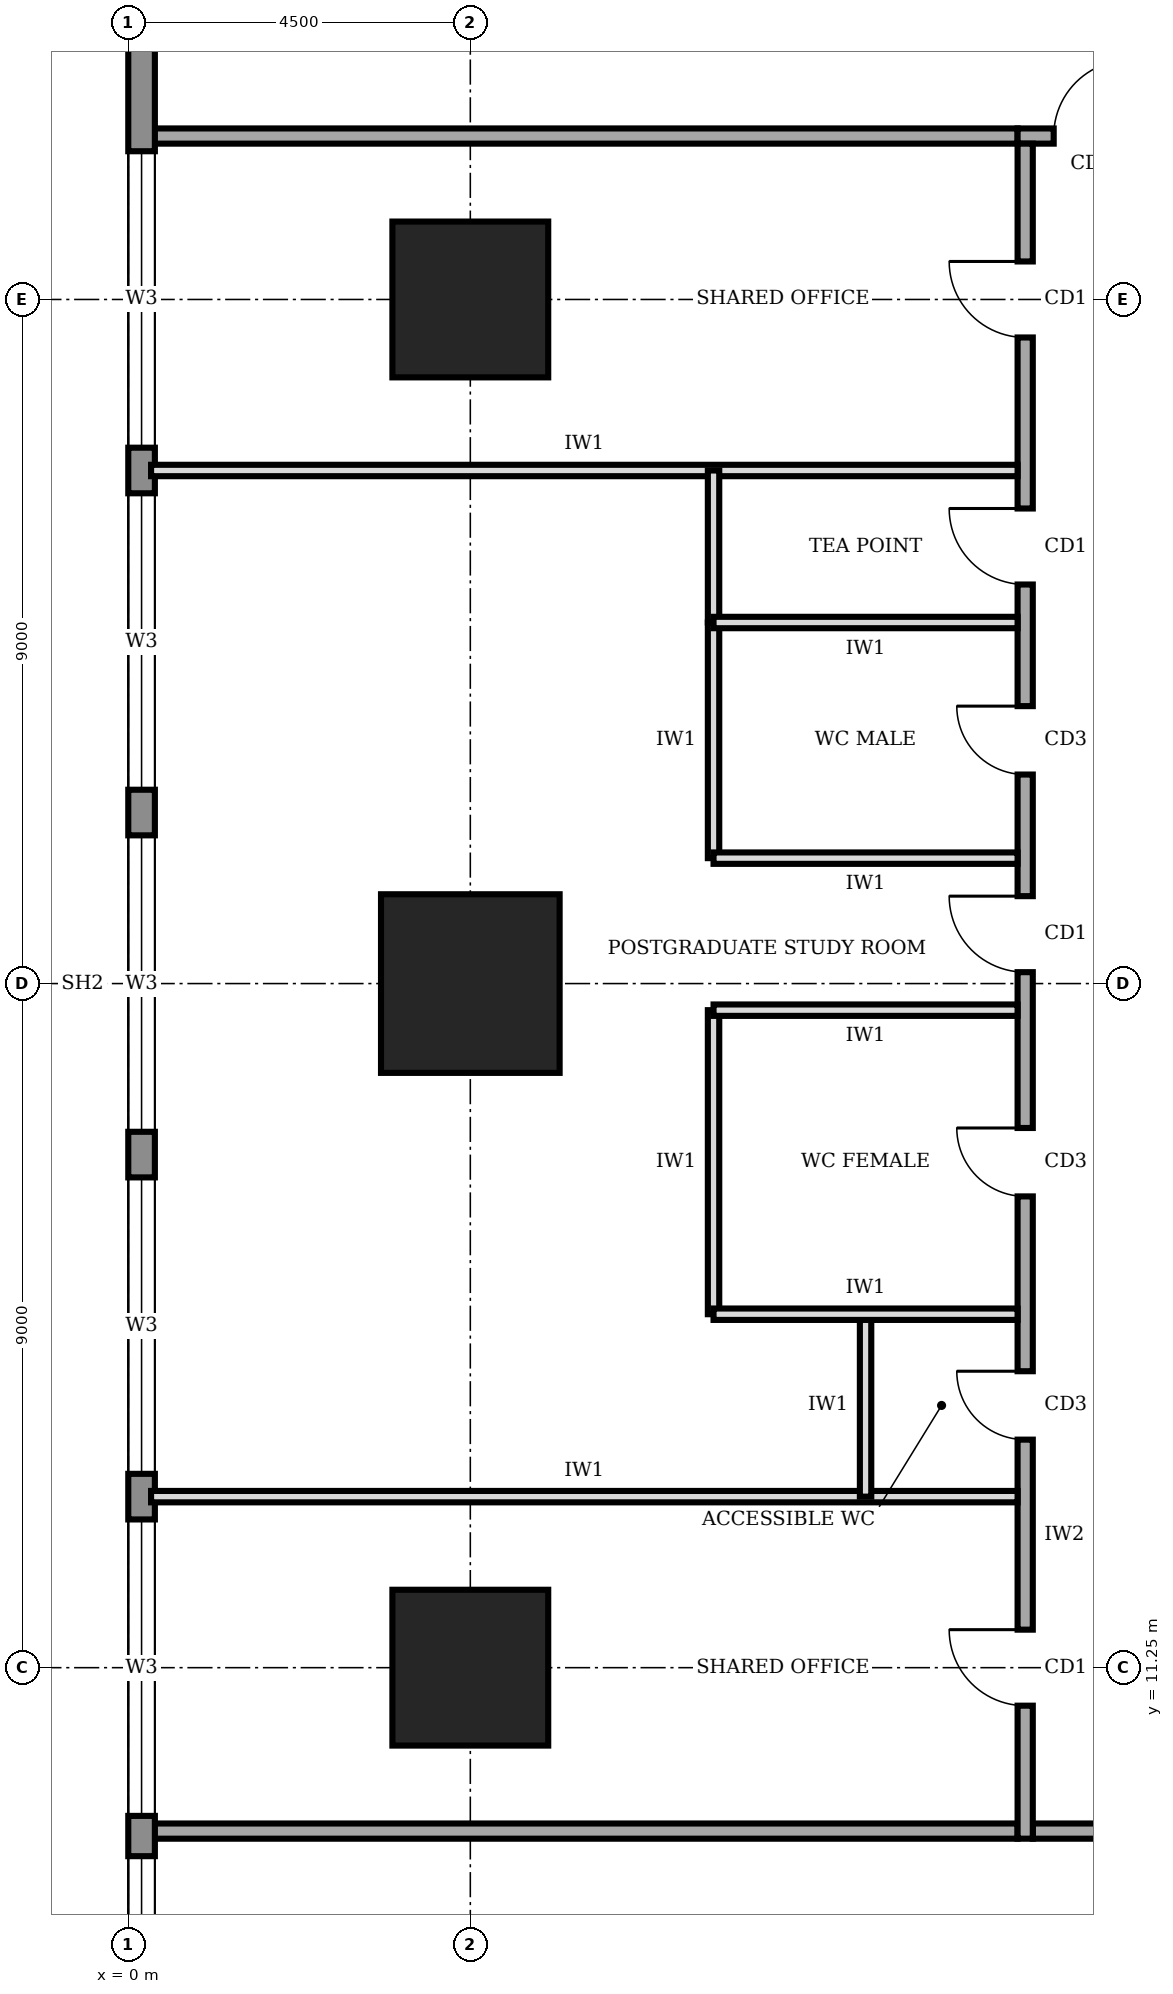
"""IFC4 building model, lengths in metres.
Left out: names, types, materials, properties, quantities, classifications, styles, units other than length and angle.
Written with IfcOpenShell. Run it as: python <this file> out.ifc"""

import sys

from ifc_helpers import new_model, si_unit, direction, frame, frame_2d, origin, origin_2d, place, context, subcontext, project, spatial, rectangle, extrude, element, fill, save


model = new_model("IFC4")
c1 = context("Model", 3, precision=1e-05, world=origin(), true_north=direction((0.0, 1.0)))
c2 = subcontext(c1, "Body", "Model", "MODEL_VIEW")
j1 = project(units=[si_unit("LENGTHUNIT", "METRE"), si_unit("PLANEANGLEUNIT", "RADIAN")], contexts=[c1])
p1 = place(None, origin())
s1 = spatial("IfcSite", under=j1, at=p1, CompositionType="ELEMENT")
p2 = place(p1, origin())
s2 = spatial("IfcBuilding", under=s1, at=p2, CompositionType="ELEMENT")
p3 = place(p2, frame((0.0, 0.0, 181.0)))
s3 = spatial("IfcBuildingStorey", under=s2, at=p3, CompositionType="ELEMENT", Elevation=181.0)
p4 = place(p3, frame((4.5, 11.25, 0.0), z_axis=(0.0, 0.0, 1.0), x_axis=(1.0, 0.0, 0.0)))
e1 = element("IfcColumn", 1, at=p4, inside=s3, PredefinedType="COLUMN", context=c2, shape_type="SweptSolid", body=[
    extrude(rectangle(XDim=2.05, YDim=2.05, at=origin_2d()), origin(), (0.0, 0.0, 1.0), 4.0),
])
p5 = place(p3, frame((4.5, 20.25, 0.0), z_axis=(0.0, 0.0, 1.0), x_axis=(1.0, 0.0, 0.0)))
e2 = element("IfcColumn", 2, at=p5, inside=s3, PredefinedType="COLUMN", context=c2, shape_type="SweptSolid", body=[
    extrude(rectangle(XDim=2.35, YDim=2.35, at=origin_2d()), origin(), (0.0, 0.0, 1.0), 4.0),
])
p6 = place(p3, frame((4.5, 29.25, 0.0), z_axis=(0.0, 0.0, 1.0), x_axis=(1.0, 0.0, 0.0)))
e3 = element("IfcColumn", 3, at=p6, inside=s3, PredefinedType="COLUMN", context=c2, shape_type="SweptSolid", body=[
    extrude(rectangle(XDim=2.05, YDim=2.05, at=origin_2d()), origin(), (0.0, 0.0, 1.0), 4.0),
])
p7 = place(p3, frame((0.175, 35.98, 0.0), z_axis=(0.0, 0.0, 1.0), x_axis=(0.0, -1.0, 0.0)))
e4 = element("IfcWall", 4, at=p7, inside=s3, PredefinedType="STANDARD", context=c2, shape_type="SweptSolid", body=[
    extrude(rectangle(XDim=31.46, YDim=0.35, at=frame_2d((15.73, 0.0))), origin(), (0.0, 0.0, 1.0), 3.75),
])
p8 = place(p7, frame((27.21, 0.0, 0.95)))
e5 = element("IfcOpeningElement", 5, at=p8, cuts=e4, PredefinedType="OPENING", context=c2, shape_type="SweptSolid", body=[
    extrude(rectangle(XDim=3.9, YDim=1.8, at=frame_2d((1.95, 0.9))), frame((0.0, 0.185, 0.0), z_axis=(0.0, -1.0, 0.0), x_axis=(1.0, 0.0, 0.0)), (0.0, 0.0, 1.0), 0.37),
])
p9 = place(p7, frame((22.78, 0.0, 0.95)))
e6 = element("IfcOpeningElement", 6, at=p9, cuts=e4, PredefinedType="OPENING", context=c2, shape_type="SweptSolid", body=[
    extrude(rectangle(XDim=3.9, YDim=1.8, at=frame_2d((1.95, 0.9))), frame((0.0, 0.185, 0.0), z_axis=(0.0, -1.0, 0.0), x_axis=(1.0, 0.0, 0.0)), (0.0, 0.0, 1.0), 0.37),
])
p10 = place(p7, frame((18.28, 0.0, 0.95)))
e7 = element("IfcOpeningElement", 7, at=p10, cuts=e4, PredefinedType="OPENING", context=c2, shape_type="SweptSolid", body=[
    extrude(rectangle(XDim=3.9, YDim=1.8, at=frame_2d((1.95, 0.9))), frame((0.0, 0.185, 0.0), z_axis=(0.0, -1.0, 0.0), x_axis=(1.0, 0.0, 0.0)), (0.0, 0.0, 1.0), 0.37),
])
p11 = place(p7, frame((13.78, 0.0, 0.95)))
e8 = element("IfcOpeningElement", 8, at=p11, cuts=e4, PredefinedType="OPENING", context=c2, shape_type="SweptSolid", body=[
    extrude(rectangle(XDim=3.9, YDim=1.8, at=frame_2d((1.95, 0.9))), frame((0.0, 0.185, 0.0), z_axis=(0.0, -1.0, 0.0), x_axis=(1.0, 0.0, 0.0)), (0.0, 0.0, 1.0), 0.37),
])
p12 = place(p7, frame((9.28, 0.0, 0.95)))
e9 = element("IfcOpeningElement", 9, at=p12, cuts=e4, PredefinedType="OPENING", context=c2, shape_type="SweptSolid", body=[
    extrude(rectangle(XDim=3.9, YDim=1.8, at=frame_2d((1.95, 0.9))), frame((0.0, 0.185, 0.0), z_axis=(0.0, -1.0, 0.0), x_axis=(1.0, 0.0, 0.0)), (0.0, 0.0, 1.0), 0.37),
])
p13 = place(p7, frame((4.78, 0.0, 0.95)))
e10 = element("IfcOpeningElement", 10, at=p13, cuts=e4, PredefinedType="OPENING", context=c2, shape_type="SweptSolid", body=[
    extrude(rectangle(XDim=3.9, YDim=1.8, at=frame_2d((1.95, 0.9))), frame((0.0, 0.185, 0.0), z_axis=(0.0, -1.0, 0.0), x_axis=(1.0, 0.0, 0.0)), (0.0, 0.0, 1.0), 0.37),
])
p14 = place(p3, frame((11.9, 9.1, 0.0), z_axis=(0.0, 0.0, 1.0), x_axis=(1.0, 0.0, 0.0)))
e11 = element("IfcWall", 11, at=p14, inside=s3, PredefinedType="SOLIDWALL", context=c2, shape_type="SweptSolid", body=[
    extrude(rectangle(XDim=16.9, YDim=0.2, at=frame_2d((8.45, 0.0))), origin(), (0.0, 0.0, 1.0), 3.75),
])
p15 = place(p14, frame((15.425, 0.0, 0.0)))
e12 = element("IfcOpeningElement", 12, at=p15, cuts=e11, PredefinedType="OPENING", context=c2, shape_type="SweptSolid", body=[
    extrude(rectangle(XDim=1.0, YDim=2.1, at=frame_2d((0.5, 1.05))), frame((0.0, 0.11, 0.0), z_axis=(0.0, -1.0, 0.0), x_axis=(1.0, 0.0, 0.0)), (0.0, 0.0, 1.0), 0.22),
])
p16 = place(p3, frame((28.6, 31.4, 0.0), z_axis=(0.0, 0.0, 1.0), x_axis=(-1.0, 0.0, 0.0)))
e13 = element("IfcWall", 13, at=p16, inside=s3, PredefinedType="SOLIDWALL", context=c2, shape_type="SweptSolid", body=[
    extrude(rectangle(XDim=16.9, YDim=0.2, at=frame_2d((8.45, 0.0))), origin(), (0.0, 0.0, 1.0), 3.75),
])
p17 = place(p16, frame((15.425, 0.0, 0.0)))
e14 = element("IfcOpeningElement", 14, at=p17, cuts=e13, PredefinedType="OPENING", context=c2, shape_type="SweptSolid", body=[
    extrude(rectangle(XDim=1.0, YDim=2.1, at=frame_2d((0.5, 1.05))), frame((0.0, 0.11, 0.0), z_axis=(0.0, -1.0, 0.0), x_axis=(1.0, 0.0, 0.0)), (0.0, 0.0, 1.0), 0.22),
])
p18 = place(p16, frame((12.35, 0.0, 0.0)))
e15 = element("IfcOpeningElement", 15, at=p18, cuts=e13, PredefinedType="OPENING", context=c2, shape_type="SweptSolid", body=[
    extrude(rectangle(XDim=1.0, YDim=2.1, at=frame_2d((0.5, 1.05))), frame((0.0, 0.11, 0.0), z_axis=(0.0, -1.0, 0.0), x_axis=(1.0, 0.0, 0.0)), (0.0, 0.0, 1.0), 0.22),
])
p19 = place(p16, frame((5.6, 0.0, 0.0)))
e16 = element("IfcOpeningElement", 16, at=p19, cuts=e13, PredefinedType="OPENING", context=c2, shape_type="SweptSolid", body=[
    extrude(rectangle(XDim=1.0, YDim=2.1, at=frame_2d((0.5, 1.05))), frame((0.0, 0.11, 0.0), z_axis=(0.0, -1.0, 0.0), x_axis=(1.0, 0.0, 0.0)), (0.0, 0.0, 1.0), 0.22),
])
p20 = place(p16, frame((0.275, 0.0, 0.0)))
e17 = element("IfcOpeningElement", 17, at=p20, cuts=e13, PredefinedType="OPENING", context=c2, shape_type="SweptSolid", body=[
    extrude(rectangle(XDim=1.0, YDim=2.1, at=frame_2d((0.5, 1.05))), frame((0.0, 0.11, 0.0), z_axis=(0.0, -1.0, 0.0), x_axis=(1.0, 0.0, 0.0)), (0.0, 0.0, 1.0), 0.22),
])
p21 = place(p3, frame((11.8, 31.3, 0.0), z_axis=(0.0, 0.0, 1.0), x_axis=(0.0, -1.0, 0.0)))
e18 = element("IfcWall", 18, at=p21, inside=s3, PredefinedType="SOLIDWALL", context=c2, shape_type="SweptSolid", body=[
    extrude(rectangle(XDim=22.3, YDim=0.2, at=frame_2d((11.15, 0.0))), origin(), (0.0, 0.0, 1.0), 3.75),
])
p22 = place(p21, frame((19.55, 0.0, 0.0)))
e19 = element("IfcOpeningElement", 19, at=p22, cuts=e18, PredefinedType="OPENING", context=c2, shape_type="SweptSolid", body=[
    extrude(rectangle(XDim=1.0, YDim=2.1, at=frame_2d((0.5, 1.05))), frame((0.0, 0.11, 0.0), z_axis=(0.0, -1.0, 0.0), x_axis=(1.0, 0.0, 0.0)), (0.0, 0.0, 1.0), 0.22),
])
p23 = place(p21, frame((16.15, 0.0, 0.0)))
e20 = element("IfcOpeningElement", 20, at=p23, cuts=e18, PredefinedType="OPENING", context=c2, shape_type="SweptSolid", body=[
    extrude(rectangle(XDim=0.9, YDim=2.1, at=frame_2d((0.45, 1.05))), frame((0.0, 0.11, 0.0), z_axis=(0.0, -1.0, 0.0), x_axis=(1.0, 0.0, 0.0)), (0.0, 0.0, 1.0), 0.22),
])
p24 = place(p21, frame((12.95, 0.0, 0.0)))
e21 = element("IfcOpeningElement", 21, at=p24, cuts=e18, PredefinedType="OPENING", context=c2, shape_type="SweptSolid", body=[
    extrude(rectangle(XDim=0.9, YDim=2.1, at=frame_2d((0.45, 1.05))), frame((0.0, 0.11, 0.0), z_axis=(0.0, -1.0, 0.0), x_axis=(1.0, 0.0, 0.0)), (0.0, 0.0, 1.0), 0.22),
])
p25 = place(p21, frame((7.4, 0.0, 0.0)))
e22 = element("IfcOpeningElement", 22, at=p25, cuts=e18, PredefinedType="OPENING", context=c2, shape_type="SweptSolid", body=[
    extrude(rectangle(XDim=0.9, YDim=2.1, at=frame_2d((0.45, 1.05))), frame((0.0, 0.11, 0.0), z_axis=(0.0, -1.0, 0.0), x_axis=(1.0, 0.0, 0.0)), (0.0, 0.0, 1.0), 0.22),
])
p26 = place(p21, frame((4.8, 0.0, 0.0)))
e23 = element("IfcOpeningElement", 23, at=p26, cuts=e18, PredefinedType="OPENING", context=c2, shape_type="SweptSolid", body=[
    extrude(rectangle(XDim=1.0, YDim=2.1, at=frame_2d((0.5, 1.05))), frame((0.0, 0.11, 0.0), z_axis=(0.0, -1.0, 0.0), x_axis=(1.0, 0.0, 0.0)), (0.0, 0.0, 1.0), 0.22),
])
p27 = place(p21, frame((9.9, 0.0, 0.0)))
e24 = element("IfcOpeningElement", 24, at=p27, cuts=e18, PredefinedType="OPENING", context=c2, shape_type="SweptSolid", body=[
    extrude(rectangle(XDim=1.0, YDim=2.1, at=frame_2d((0.5, 1.05))), frame((0.0, 0.11, 0.0), z_axis=(0.0, -1.0, 0.0), x_axis=(1.0, 0.0, 0.0)), (0.0, 0.0, 1.0), 0.22),
])
p28 = place(p21, frame((1.55, 0.0, 0.0)))
e25 = element("IfcOpeningElement", 25, at=p28, cuts=e18, PredefinedType="OPENING", context=c2, shape_type="SweptSolid", body=[
    extrude(rectangle(XDim=1.0, YDim=2.1, at=frame_2d((0.5, 1.05))), frame((0.0, 0.11, 0.0), z_axis=(0.0, -1.0, 0.0), x_axis=(1.0, 0.0, 0.0)), (0.0, 0.0, 1.0), 0.22),
])
for number, where, z_axis, x_axis in (
    (26, (0.3, 9.1, 0.0), (0.0, 0.0, 1.0), (1.0, 0.0, 0.0)),
    (27, (0.3, 31.4, 0.0), (0.0, 0.0, 1.0), (1.0, 0.0, 0.0)),
):
    element("IfcWall", number, at=place(p3, frame(where, z_axis=z_axis, x_axis=x_axis)), inside=s3, PredefinedType="SOLIDWALL", context=c2, shape_type="SweptSolid", body=[
        extrude(rectangle(XDim=11.4, YDim=0.2, at=frame_2d((5.7, 0.0))), origin(), (0.0, 0.0, 1.0), 3.75),
    ])
for number, where, z_axis, x_axis in (
    (28, (0.3, 13.5, 0.0), (0.0, 0.0, 1.0), (1.0, 0.0, 0.0)),
    (29, (0.3, 27.0, 0.0), (0.0, 0.0, 1.0), (1.0, 0.0, 0.0)),
):
    element("IfcWall", number, at=place(p3, frame(where, z_axis=z_axis, x_axis=x_axis)), inside=s3, PredefinedType="PARTITIONING", context=c2, shape_type="SweptSolid", body=[
        extrude(rectangle(XDim=11.4, YDim=0.15, at=frame_2d((5.7, 0.0))), origin(), (0.0, 0.0, 1.0), 3.75),
    ])
p29 = place(p3, frame((11.7, 15.9, 0.0), z_axis=(0.0, 0.0, 1.0), x_axis=(-1.0, 0.0, 0.0)))
e30 = element("IfcWall", 30, at=p29, inside=s3, PredefinedType="PARTITIONING", context=c2, shape_type="SweptSolid", body=[
    extrude(rectangle(XDim=4.0, YDim=0.15, at=frame_2d((2.0, 0.0))), origin(), (0.0, 0.0, 1.0), 3.75),
])
p30 = place(p3, frame((11.7, 19.9, 0.0), z_axis=(0.0, 0.0, 1.0), x_axis=(-1.0, 0.0, 0.0)))
e31 = element("IfcWall", 31, at=p30, inside=s3, PredefinedType="PARTITIONING", context=c2, shape_type="SweptSolid", body=[
    extrude(rectangle(XDim=4.0, YDim=0.15, at=frame_2d((2.0, 0.0))), origin(), (0.0, 0.0, 1.0), 2.85),
])
for number, where, z_axis, x_axis in (
    (32, (11.7, 21.9, 0.0), (0.0, 0.0, 1.0), (-1.0, 0.0, 0.0)),
    (33, (11.7, 25.0, 0.0), (0.0, 0.0, 1.0), (-1.0, 0.0, 0.0)),
):
    element("IfcWall", number, at=place(p3, frame(where, z_axis=z_axis, x_axis=x_axis)), inside=s3, PredefinedType="PARTITIONING", context=c2, shape_type="SweptSolid", body=[
        extrude(rectangle(XDim=4.0, YDim=0.15, at=frame_2d((2.0, 0.0))), origin(), (0.0, 0.0, 1.0), 3.75),
    ])
p31 = place(p3, frame((9.7, 13.5, 0.0), z_axis=(0.0, 0.0, 1.0), x_axis=(0.0, 1.0, 0.0)))
e34 = element("IfcWall", 34, at=p31, inside=s3, PredefinedType="PARTITIONING", context=c2, shape_type="SweptSolid", body=[
    extrude(rectangle(XDim=2.4, YDim=0.15, at=frame_2d((1.2, 0.0))), origin(), (0.0, 0.0, 1.0), 3.75),
])
p32 = place(p3, frame((7.7, 15.9, 0.0), z_axis=(0.0, 0.0, 1.0), x_axis=(0.0, 1.0, 0.0)))
e35 = element("IfcWall", 35, at=p32, inside=s3, PredefinedType="PARTITIONING", context=c2, shape_type="SweptSolid", body=[
    extrude(rectangle(XDim=4.0, YDim=0.15, at=frame_2d((2.0, 0.0))), origin(), (0.0, 0.0, 1.0), 3.75),
])
p33 = place(p3, frame((7.7, 21.9, 0.0), z_axis=(0.0, 0.0, 1.0), x_axis=(0.0, 1.0, 0.0)))
e36 = element("IfcWall", 36, at=p33, inside=s3, PredefinedType="PARTITIONING", context=c2, shape_type="SweptSolid", body=[
    extrude(rectangle(XDim=3.1, YDim=0.15, at=frame_2d((1.55, 0.0))), origin(), (0.0, 0.0, 1.0), 3.75),
])
p34 = place(p3, frame((7.7, 25.0, 0.0), z_axis=(0.0, 0.0, 1.0), x_axis=(0.0, 1.0, 0.0)))
e37 = element("IfcWall", 37, at=p34, inside=s3, PredefinedType="PARTITIONING", context=c2, shape_type="SweptSolid", body=[
    extrude(rectangle(XDim=2.0, YDim=0.15, at=frame_2d((1.0, 0.0))), origin(), (0.0, 0.0, 1.0), 3.75),
])
p35 = place(p8, origin())
e38 = element("IfcWindow", 38, at=p35, inside=s3, PartitioningType="SINGLE_PANEL", PredefinedType="WINDOW", context=c2, shape_type="SweptSolid", body=[
    extrude(rectangle(XDim=3.9, YDim=1.8, at=frame_2d((1.95, 0.9))), frame((0.0, 0.03, 0.0), z_axis=(0.0, -1.0, 0.0), x_axis=(1.0, 0.0, 0.0)), (0.0, 0.0, 1.0), 0.06),
])
fill(e5, e38)
p36 = place(p9, origin())
e39 = element("IfcWindow", 39, at=p36, inside=s3, PartitioningType="SINGLE_PANEL", PredefinedType="WINDOW", context=c2, shape_type="SweptSolid", body=[
    extrude(rectangle(XDim=3.9, YDim=1.8, at=frame_2d((1.95, 0.9))), frame((0.0, 0.03, 0.0), z_axis=(0.0, -1.0, 0.0), x_axis=(1.0, 0.0, 0.0)), (0.0, 0.0, 1.0), 0.06),
])
fill(e6, e39)
p37 = place(p10, origin())
e40 = element("IfcWindow", 40, at=p37, inside=s3, PartitioningType="SINGLE_PANEL", PredefinedType="WINDOW", context=c2, shape_type="SweptSolid", body=[
    extrude(rectangle(XDim=3.9, YDim=1.8, at=frame_2d((1.95, 0.9))), frame((0.0, 0.03, 0.0), z_axis=(0.0, -1.0, 0.0), x_axis=(1.0, 0.0, 0.0)), (0.0, 0.0, 1.0), 0.06),
])
fill(e7, e40)
p38 = place(p11, origin())
e41 = element("IfcWindow", 41, at=p38, inside=s3, PartitioningType="SINGLE_PANEL", PredefinedType="WINDOW", context=c2, shape_type="SweptSolid", body=[
    extrude(rectangle(XDim=3.9, YDim=1.8, at=frame_2d((1.95, 0.9))), frame((0.0, 0.03, 0.0), z_axis=(0.0, -1.0, 0.0), x_axis=(1.0, 0.0, 0.0)), (0.0, 0.0, 1.0), 0.06),
])
fill(e8, e41)
p39 = place(p12, origin())
e42 = element("IfcWindow", 42, at=p39, inside=s3, PartitioningType="SINGLE_PANEL", PredefinedType="WINDOW", context=c2, shape_type="SweptSolid", body=[
    extrude(rectangle(XDim=3.9, YDim=1.8, at=frame_2d((1.95, 0.9))), frame((0.0, 0.03, 0.0), z_axis=(0.0, -1.0, 0.0), x_axis=(1.0, 0.0, 0.0)), (0.0, 0.0, 1.0), 0.06),
])
fill(e9, e42)
p40 = place(p13, origin())
e43 = element("IfcWindow", 43, at=p40, inside=s3, PartitioningType="SINGLE_PANEL", PredefinedType="WINDOW", context=c2, shape_type="SweptSolid", body=[
    extrude(rectangle(XDim=3.9, YDim=1.8, at=frame_2d((1.95, 0.9))), frame((0.0, 0.03, 0.0), z_axis=(0.0, -1.0, 0.0), x_axis=(1.0, 0.0, 0.0)), (0.0, 0.0, 1.0), 0.06),
])
fill(e10, e43)
p41 = place(p17, frame((1.0, 0.0, 0.0), z_axis=(0.0, 0.0, 1.0), x_axis=(-1.0, 0.0, 0.0)))
e44 = element("IfcDoor", 44, at=p41, inside=s3, OperationType="SINGLE_SWING_RIGHT", PredefinedType="DOOR", context=c2, shape_type="SweptSolid", body=[
    extrude(rectangle(XDim=1.0, YDim=2.1, at=frame_2d((0.5, 1.05))), frame((0.0, 0.025, 0.0), z_axis=(0.0, -1.0, 0.0), x_axis=(1.0, 0.0, 0.0)), (0.0, 0.0, 1.0), 0.05),
])
fill(e14, e44)
p42 = place(p22, frame((1.0, 0.0, 0.0), z_axis=(0.0, 0.0, 1.0), x_axis=(-1.0, 0.0, 0.0)))
e45 = element("IfcDoor", 45, at=p42, inside=s3, OperationType="SINGLE_SWING_RIGHT", PredefinedType="DOOR", context=c2, shape_type="SweptSolid", body=[
    extrude(rectangle(XDim=1.0, YDim=2.1, at=frame_2d((0.5, 1.05))), frame((0.0, 0.025, 0.0), z_axis=(0.0, -1.0, 0.0), x_axis=(1.0, 0.0, 0.0)), (0.0, 0.0, 1.0), 0.05),
])
fill(e19, e45)
p43 = place(p23, frame((0.9, 0.0, 0.0), z_axis=(0.0, 0.0, 1.0), x_axis=(-1.0, 0.0, 0.0)))
e46 = element("IfcDoor", 46, at=p43, inside=s3, OperationType="SINGLE_SWING_RIGHT", PredefinedType="DOOR", context=c2, shape_type="SweptSolid", body=[
    extrude(rectangle(XDim=0.9, YDim=2.1, at=frame_2d((0.45, 1.05))), frame((0.0, 0.025, 0.0), z_axis=(0.0, -1.0, 0.0), x_axis=(1.0, 0.0, 0.0)), (0.0, 0.0, 1.0), 0.05),
])
fill(e20, e46)
p44 = place(p24, frame((0.9, 0.0, 0.0), z_axis=(0.0, 0.0, 1.0), x_axis=(-1.0, 0.0, 0.0)))
e47 = element("IfcDoor", 47, at=p44, inside=s3, OperationType="SINGLE_SWING_RIGHT", PredefinedType="DOOR", context=c2, shape_type="SweptSolid", body=[
    extrude(rectangle(XDim=0.9, YDim=2.1, at=frame_2d((0.45, 1.05))), frame((0.0, 0.025, 0.0), z_axis=(0.0, -1.0, 0.0), x_axis=(1.0, 0.0, 0.0)), (0.0, 0.0, 1.0), 0.05),
])
fill(e21, e47)
p45 = place(p25, frame((0.9, 0.0, 0.0), z_axis=(0.0, 0.0, 1.0), x_axis=(-1.0, 0.0, 0.0)))
e48 = element("IfcDoor", 48, at=p45, inside=s3, OperationType="SINGLE_SWING_RIGHT", PredefinedType="DOOR", context=c2, shape_type="SweptSolid", body=[
    extrude(rectangle(XDim=0.9, YDim=2.1, at=frame_2d((0.45, 1.05))), frame((0.0, 0.025, 0.0), z_axis=(0.0, -1.0, 0.0), x_axis=(1.0, 0.0, 0.0)), (0.0, 0.0, 1.0), 0.05),
])
fill(e22, e48)
p46 = place(p26, frame((1.0, 0.0, 0.0), z_axis=(0.0, 0.0, 1.0), x_axis=(-1.0, 0.0, 0.0)))
e49 = element("IfcDoor", 49, at=p46, inside=s3, OperationType="SINGLE_SWING_RIGHT", PredefinedType="DOOR", context=c2, shape_type="SweptSolid", body=[
    extrude(rectangle(XDim=1.0, YDim=2.1, at=frame_2d((0.5, 1.05))), frame((0.0, 0.025, 0.0), z_axis=(0.0, -1.0, 0.0), x_axis=(1.0, 0.0, 0.0)), (0.0, 0.0, 1.0), 0.05),
])
fill(e23, e49)
p47 = place(p27, frame((1.0, 0.0, 0.0), z_axis=(0.0, 0.0, 1.0), x_axis=(-1.0, 0.0, 0.0)))
e50 = element("IfcDoor", 50, at=p47, inside=s3, OperationType="SINGLE_SWING_RIGHT", PredefinedType="DOOR", context=c2, shape_type="SweptSolid", body=[
    extrude(rectangle(XDim=1.0, YDim=2.1, at=frame_2d((0.5, 1.05))), frame((0.0, 0.025, 0.0), z_axis=(0.0, -1.0, 0.0), x_axis=(1.0, 0.0, 0.0)), (0.0, 0.0, 1.0), 0.05),
])
fill(e24, e50)
p48 = place(p28, frame((1.0, 0.0, 0.0), z_axis=(0.0, 0.0, 1.0), x_axis=(-1.0, 0.0, 0.0)))
e51 = element("IfcDoor", 51, at=p48, inside=s3, OperationType="SINGLE_SWING_RIGHT", PredefinedType="DOOR", context=c2, shape_type="SweptSolid", body=[
    extrude(rectangle(XDim=1.0, YDim=2.1, at=frame_2d((0.5, 1.05))), frame((0.0, 0.025, 0.0), z_axis=(0.0, -1.0, 0.0), x_axis=(1.0, 0.0, 0.0)), (0.0, 0.0, 1.0), 0.05),
])
fill(e25, e51)
save(model, sys.argv[1])
